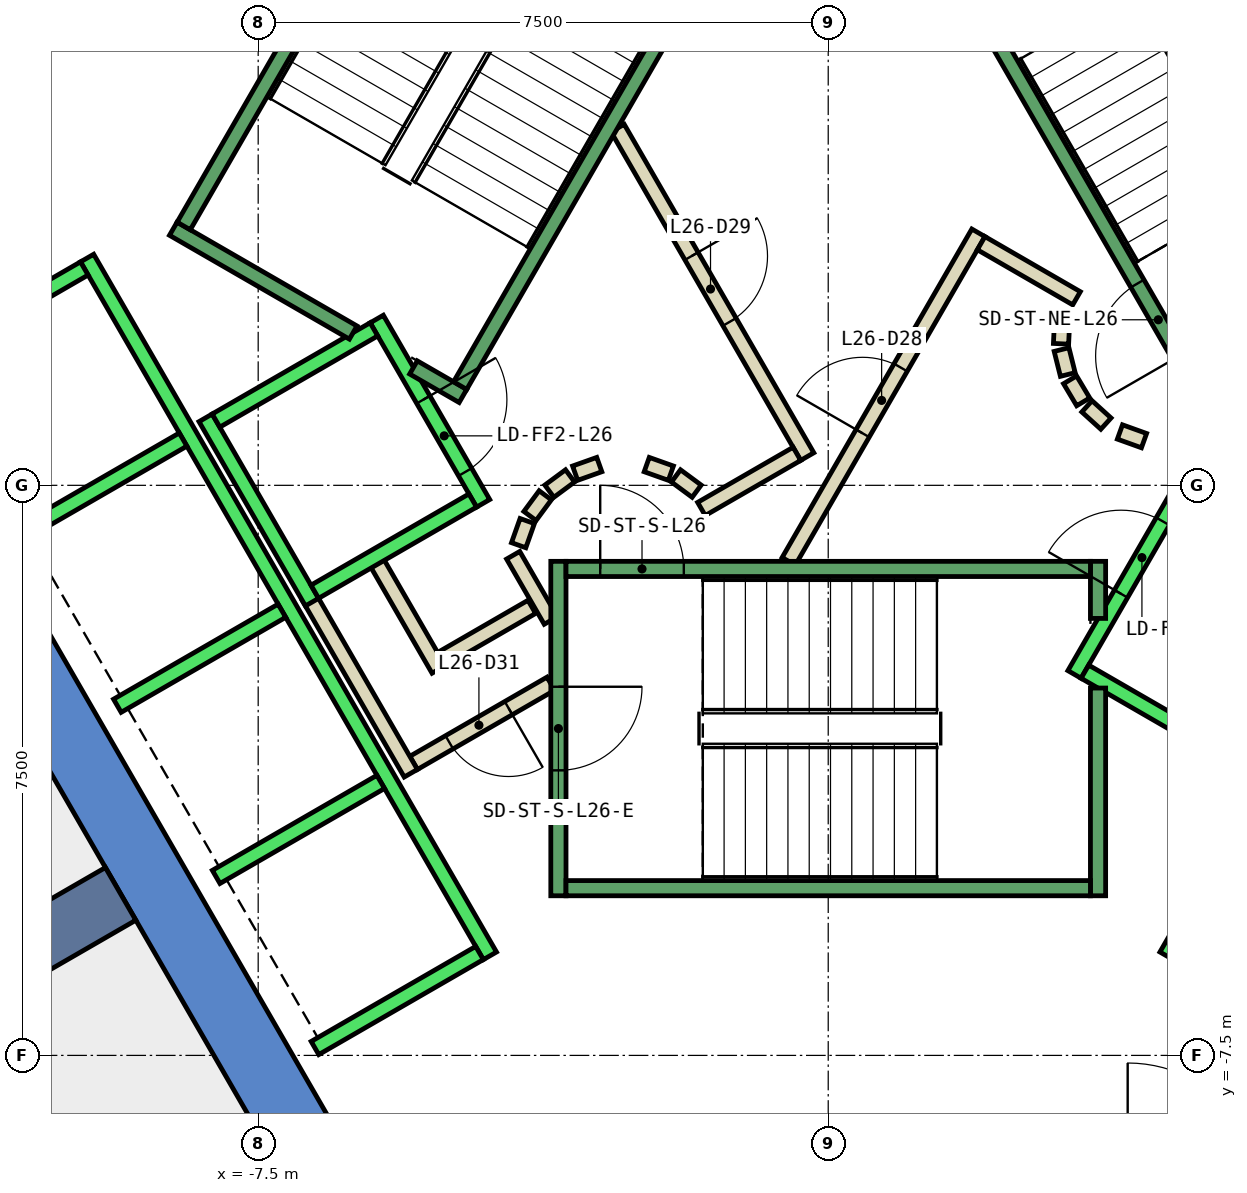
"""IFC4 building model, lengths in metres.
Left out: names, types, materials, properties, quantities, classifications, styles, units other than length and angle.
Written with IfcOpenShell. Run it as: python <this file> out.ifc"""

import sys

from ifc_helpers import new_model, si_unit, direction, frame, frame_2d, origin, place, context, subcontext, project, spatial, polyline, rectangle, outline, extrude, element, fill, save


model = new_model("IFC4")
c1 = context("Model", 3, precision=1e-05, world=origin(), true_north=direction((0.0, 1.0)))
c2 = subcontext(c1, "Body", "Model", "MODEL_VIEW")
j1 = project(units=[si_unit("LENGTHUNIT", "METRE"), si_unit("PLANEANGLEUNIT", "RADIAN")], contexts=[c1])
p1 = place(None, origin())
s1 = spatial("IfcSite", under=j1, at=p1, CompositionType="ELEMENT")
p2 = place(p1, origin())
s2 = spatial("IfcBuilding", under=s1, at=p2, CompositionType="ELEMENT")
p3 = place(p2, frame((0.0, 0.0, 120.2)))
s3 = spatial("IfcBuildingStorey", under=s2, at=p3, CompositionType="ELEMENT", Elevation=120.2)
p4 = place(p3, frame((0.0, 0.0, -0.4)))
e1 = element("IfcWall", 1, at=p4, inside=s3, PredefinedType="SHEAR", context=c2, shape_type="SweptSolid", body=[
    extrude(outline(polyline([(-12.267, 5.252), (-11.488, 4.802), (-6.409, 13.6), (-6.928, 14.5), (-12.267, 5.252)])), origin(), (0.0, 0.0, 1.0), 4.2),
])
p5 = place(p3, frame((0.0, 0.0, -0.4)))
e2 = element("IfcWall", 2, at=p5, inside=s3, PredefinedType="SHEAR", context=c2, shape_type="SweptSolid", body=[
    extrude(outline(polyline([(-13.856, 2.5), (-6.928, -9.5), (-6.409, -8.6), (-12.817, 2.5), (-13.856, 2.5)])), origin(), (0.0, 0.0, 1.0), 4.2),
])
p6 = place(p3, frame((-9.31, -5.375, -0.4), z_axis=(0.0, 0.0, 1.0), x_axis=(-0.866017533419, -0.500013631625, 0.0)))
e3 = element("IfcWall", 3, at=p6, inside=s3, PredefinedType="SHEAR", context=c2, shape_type="SweptSolid", body=[
    extrude(rectangle(XDim=9.0, YDim=0.8, at=frame_2d((4.5, 0.0))), origin(), (0.0, 0.0, 1.0), 4.2),
])
p7 = place(p3, frame((-3.9, -1.599, 0.0), z_axis=(0.0, 0.0, 1.0), x_axis=(-0.865969445389, -0.500096910261, 0.0)))
e4 = element("IfcWall", 4, at=p7, inside=s3, PredefinedType="PARTITIONING", context=c2, shape_type="SweptSolid", body=[
    extrude(rectangle(XDim=1.373, YDim=0.2, at=frame_2d((0.687, 0.0))), origin(), (0.0, 0.0, 1.0), 3.8),
])
p8 = place(p3, frame((-5.126, -2.422, 0.0), z_axis=(0.0, 0.0, 1.0), x_axis=(-0.500062241894, 0.865989465428, 0.0)))
e5 = element("IfcWall", 5, at=p8, inside=s3, PredefinedType="PARTITIONING", context=c2, shape_type="SweptSolid", body=[
    extrude(rectangle(XDim=1.7, YDim=0.2, at=frame_2d((0.85, 0.0))), origin(), (0.0, 0.0, 1.0), 3.8),
])
p9 = place(p3, frame((-3.65, -2.61, 0.0), z_axis=(0.0, 0.0, 1.0), x_axis=(-0.866072462134, -0.499918483688, 0.0)))
e6 = element("IfcWall", 6, at=p9, inside=s3, PredefinedType="PARTITIONING", context=c2, shape_type="SweptSolid", body=[
    extrude(rectangle(XDim=2.084, YDim=0.2, at=frame_2d((1.042, 0.0))), origin(), (0.0, 0.0, 1.0), 3.8),
])
p10 = place(p9, frame((0.642, 0.0, 0.0)))
e7 = element("IfcOpeningElement", 7, at=p10, cuts=e6, PredefinedType="OPENING", context=c2, shape_type="SweptSolid", body=[
    extrude(rectangle(XDim=0.9, YDim=2.1, at=frame_2d((0.45, 1.05))), frame((0.0, 0.11, 0.0), z_axis=(0.0, -1.0, 0.0), x_axis=(1.0, 0.0, 0.0)), (0.0, 0.0, 1.0), 0.22),
])
p11 = place(p3, frame((-5.492, -3.788, 0.0), z_axis=(0.0, 0.0, 1.0), x_axis=(-0.500008949224, 0.866020236886, 0.0)))
e8 = element("IfcWall", 8, at=p11, inside=s3, PredefinedType="PARTITIONING", context=c2, shape_type="SweptSolid", body=[
    extrude(rectangle(XDim=2.68, YDim=0.2, at=frame_2d((1.34, 0.0))), origin(), (0.0, 0.0, 1.0), 3.8),
])
p12 = place(p3, frame((-4.145, -0.92, 0.0), z_axis=(0.0, 0.0, 1.0), x_axis=(0.499743786207, -0.866173278362, 0.0)))
e9 = element("IfcWall", 9, at=p12, inside=s3, PredefinedType="PARTITIONING", context=c2, shape_type="SweptSolid", body=[
    extrude(rectangle(XDim=0.991, YDim=0.2, at=frame_2d((0.495, 0.0))), origin(), (0.0, 0.0, 1.0), 3.8),
])
p13 = place(p3, frame((-0.52, -1.0, 0.0), z_axis=(0.0, 0.0, 1.0), x_axis=(0.50011622646, 0.865958290007, 0.0)))
e10 = element("IfcWall", 10, at=p13, inside=s3, PredefinedType="PARTITIONING", context=c2, shape_type="SweptSolid", body=[
    extrude(rectangle(XDim=4.991, YDim=0.2, at=frame_2d((2.496, 0.0))), origin(), (0.0, 0.0, 1.0), 3.8),
])
p14 = place(p13, frame((1.945, 0.0, 0.0)))
e11 = element("IfcOpeningElement", 11, at=p14, cuts=e10, PredefinedType="OPENING", context=c2, shape_type="SweptSolid", body=[
    extrude(rectangle(XDim=1.0, YDim=2.1, at=frame_2d((0.5, 1.05))), frame((0.0, 0.11, 0.0), z_axis=(0.0, -1.0, 0.0), x_axis=(1.0, 0.0, 0.0)), (0.0, 0.0, 1.0), 0.22),
])
p15 = place(p3, frame((2.012, 3.186, 0.0), z_axis=(0.0, 0.0, 1.0), x_axis=(0.865891012941, -0.500232699559, 0.0)))
e12 = element("IfcWall", 12, at=p15, inside=s3, PredefinedType="PARTITIONING", context=c2, shape_type="SweptSolid", body=[
    extrude(rectangle(XDim=1.449, YDim=0.2, at=frame_2d((0.725, 0.0))), origin(), (0.0, 0.0, 1.0), 3.8),
])
p16 = place(p3, frame((3.079, 2.199, 0.0), z_axis=(0.0, 0.0, 1.0), x_axis=(-0.047771483479, -0.998858290933, 0.0)))
e13 = element("IfcWall", 13, at=p16, inside=s3, PredefinedType="PARTITIONING", context=c2, shape_type="SweptSolid", body=[
    extrude(rectangle(XDim=0.337, YDim=0.2, at=frame_2d((0.169, 0.0))), origin(), (0.0, 0.0, 1.0), 3.8),
])
p17 = place(p3, frame((3.07, 1.786, 0.0), z_axis=(0.0, 0.0, 1.0), x_axis=(0.242705583207, -0.970099994784, 0.0)))
e14 = element("IfcWall", 14, at=p17, inside=s3, PredefinedType="PARTITIONING", context=c2, shape_type="SweptSolid", body=[
    extrude(rectangle(XDim=0.338, YDim=0.2, at=frame_2d((0.169, 0.0))), origin(), (0.0, 0.0, 1.0), 3.8),
])
for number, where, z_axis, x_axis in (
    (15, (3.182, 1.388, 0.0), (0.0, 0.0, 1.0), (0.512, -0.859, 0.0)),
    (16, (3.404, 1.039, 0.0), (0.0, 0.0, 1.0), (0.74, -0.672, 0.0)),
):
    element("IfcWall", number, at=place(p3, frame(where, z_axis=z_axis, x_axis=x_axis)), inside=s3, PredefinedType="PARTITIONING", context=c2, shape_type="SweptSolid", body=[
        extrude(rectangle(XDim=0.338, YDim=0.2, at=frame_2d((0.169, 0.0))), origin(), (0.0, 0.0, 1.0), 3.8),
    ])
p18 = place(p3, frame((3.838, 0.702, 0.0), z_axis=(0.0, 0.0, 1.0), x_axis=(0.941035081519, -0.338308993895, 0.0)))
e17 = element("IfcWall", 17, at=p18, inside=s3, PredefinedType="PARTITIONING", context=c2, shape_type="SweptSolid", body=[
    extrude(rectangle(XDim=0.337, YDim=0.2, at=frame_2d((0.168, 0.0))), origin(), (0.0, 0.0, 1.0), 3.8),
])
p19 = place(p3, frame((-2.771, 4.7, 0.0), z_axis=(0.0, 0.0, 1.0), x_axis=(0.499969479948, -0.866043023828, 0.0)))
e18 = element("IfcWall", 18, at=p19, inside=s3, PredefinedType="PARTITIONING", context=c2, shape_type="SweptSolid", body=[
    extrude(rectangle(XDim=4.99, YDim=0.2, at=frame_2d((2.495, 0.0))), origin(), (0.0, 0.0, 1.0), 3.8),
])
p20 = place(p19, frame((1.945, 0.0, 0.0)))
e19 = element("IfcOpeningElement", 19, at=p20, cuts=e18, PredefinedType="OPENING", context=c2, shape_type="SweptSolid", body=[
    extrude(rectangle(XDim=1.0, YDim=2.1, at=frame_2d((0.5, 1.05))), frame((0.0, 0.11, 0.0), z_axis=(0.0, -1.0, 0.0), x_axis=(1.0, 0.0, 0.0)), (0.0, 0.0, 1.0), 0.22),
])
p21 = place(p3, frame((-0.412, 0.414, 0.0), z_axis=(0.0, 0.0, 1.0), x_axis=(-0.866017369001, -0.500013916395, 0.0)))
e20 = element("IfcWall", 20, at=p21, inside=s3, PredefinedType="PARTITIONING", context=c2, shape_type="SweptSolid", body=[
    extrude(rectangle(XDim=1.45, YDim=0.2, at=frame_2d((0.725, 0.0))), origin(), (0.0, 0.0, 1.0), 3.8),
])
p22 = place(p3, frame((-1.731, -0.077, 0.0), z_axis=(0.0, 0.0, 1.0), x_axis=(-0.804311165252, 0.594208338422, 0.0)))
e21 = element("IfcWall", 21, at=p22, inside=s3, PredefinedType="PARTITIONING", context=c2, shape_type="SweptSolid", body=[
    extrude(rectangle(XDim=0.338, YDim=0.2, at=frame_2d((0.169, 0.0))), origin(), (0.0, 0.0, 1.0), 3.8),
])
p23 = place(p3, frame((-2.07, 0.16, 0.0), z_axis=(0.0, 0.0, 1.0), x_axis=(-0.942199461132, 0.335052496547, 0.0)))
e22 = element("IfcWall", 22, at=p23, inside=s3, PredefinedType="PARTITIONING", context=c2, shape_type="SweptSolid", body=[
    extrude(rectangle(XDim=0.337, YDim=0.2, at=frame_2d((0.169, 0.0))), origin(), (0.0, 0.0, 1.0), 3.8),
])
p24 = place(p3, frame((-3.012, 0.273, 0.0), z_axis=(0.0, 0.0, 1.0), x_axis=(-0.942280615813, -0.334824194261, 0.0)))
e23 = element("IfcWall", 23, at=p24, inside=s3, PredefinedType="PARTITIONING", context=c2, shape_type="SweptSolid", body=[
    extrude(rectangle(XDim=0.338, YDim=0.2, at=frame_2d((0.169, 0.0))), origin(), (0.0, 0.0, 1.0), 3.8),
])
p25 = place(p3, frame((-3.397, 0.124, 0.0), z_axis=(0.0, 0.0, 1.0), x_axis=(-0.804311165252, -0.594208338422, 0.0)))
e24 = element("IfcWall", 24, at=p25, inside=s3, PredefinedType="PARTITIONING", context=c2, shape_type="SweptSolid", body=[
    extrude(rectangle(XDim=0.338, YDim=0.2, at=frame_2d((0.169, 0.0))), origin(), (0.0, 0.0, 1.0), 3.8),
])
p26 = place(p3, frame((-3.723, -0.131, 0.0), z_axis=(0.0, 0.0, 1.0), x_axis=(-0.594675113454, -0.803966112121, 0.0)))
e25 = element("IfcWall", 25, at=p26, inside=s3, PredefinedType="PARTITIONING", context=c2, shape_type="SweptSolid", body=[
    extrude(rectangle(XDim=0.338, YDim=0.2, at=frame_2d((0.169, 0.0))), origin(), (0.0, 0.0, 1.0), 3.8),
])
p27 = place(p3, frame((-3.96, -0.47, 0.0), z_axis=(0.0, 0.0, 1.0), x_axis=(-0.334824194261, -0.942280615813, 0.0)))
e26 = element("IfcWall", 26, at=p27, inside=s3, PredefinedType="PARTITIONING", context=c2, shape_type="SweptSolid", body=[
    extrude(rectangle(XDim=0.338, YDim=0.2, at=frame_2d((0.169, 0.0))), origin(), (0.0, 0.0, 1.0), 3.8),
])
p28 = place(p3, frame((-5.94, 2.188, 0.0), z_axis=(0.0, 0.0, 1.0), x_axis=(0.49994636267, -0.866056369097, 0.0)))
e27 = element("IfcWall", 27, at=p28, inside=s3, PredefinedType="STANDARD", context=c2, shape_type="SweptSolid", body=[
    extrude(rectangle(XDim=2.8, YDim=0.2, at=frame_2d((1.4, 0.0))), origin(), (0.0, 0.0, 1.0), 3.8),
])
p29 = place(p28, frame((1.225, 0.0, 0.0)))
e28 = element("IfcOpeningElement", 28, at=p29, cuts=e27, PredefinedType="OPENING", context=c2, shape_type="SweptSolid", body=[
    extrude(rectangle(XDim=1.1, YDim=2.1, at=frame_2d((0.55, 1.05))), frame((0.0, 0.11, 0.0), z_axis=(0.0, -1.0, 0.0), x_axis=(1.0, 0.0, 0.0)), (0.0, 0.0, 1.0), 0.22),
])
p30 = place(p3, frame((-8.192, 0.888, 0.0), z_axis=(0.0, 0.0, 1.0), x_axis=(0.49994636267, -0.866056369097, 0.0)))
e29 = element("IfcWall", 29, at=p30, inside=s3, PredefinedType="STANDARD", context=c2, shape_type="SweptSolid", body=[
    extrude(rectangle(XDim=2.8, YDim=0.2, at=frame_2d((1.4, 0.0))), origin(), (0.0, 0.0, 1.0), 3.8),
])
for number, where, z_axis, x_axis in (
    (30, (-5.977, 2.052, 0.0), (0.0, 0.0, 1.0), (-0.866, -0.5, 0.0)),
    (31, (-4.677, -0.2, 0.0), (0.0, 0.0, 1.0), (-0.866, -0.5, 0.0)),
):
    element("IfcWall", number, at=place(p3, frame(where, z_axis=z_axis, x_axis=x_axis)), inside=s3, PredefinedType="STANDARD", context=c2, shape_type="SweptSolid", body=[
        extrude(rectangle(XDim=2.399, YDim=0.2, at=frame_2d((1.2, 0.0))), origin(), (0.0, 0.0, 1.0), 3.8),
    ])
p31 = place(p3, frame((-9.751, 2.99, 0.0), z_axis=(0.0, 0.0, 1.0), x_axis=(0.50000090737, -0.866024879913, 0.0)))
e32 = element("IfcWall", 32, at=p31, inside=s3, PredefinedType="STANDARD", context=c2, shape_type="SweptSolid", body=[
    extrude(rectangle(XDim=10.6, YDim=0.2, at=frame_2d((5.3, 0.0))), origin(), (0.0, 0.0, 1.0), 3.8),
])
p32 = place(p3, frame((-9.788, 2.853, 0.0), z_axis=(0.0, 0.0, 1.0), x_axis=(-0.865998541277, -0.500046524342, 0.0)))
e33 = element("IfcWall", 33, at=p32, inside=s3, PredefinedType="STANDARD", context=c2, shape_type="SweptSolid", body=[
    extrude(rectangle(XDim=2.5, YDim=0.2, at=frame_2d((1.25, 0.0))), origin(), (0.0, 0.0, 1.0), 3.8),
])
for number, where, z_axis, x_axis in (
    (34, (-8.488, 0.602, 0.0), (0.0, 0.0, 1.0), (-0.866, -0.5, 0.0)),
    (35, (-7.188, -1.65, 0.0), (0.0, 0.0, 1.0), (-0.866, -0.5, 0.0)),
    (36, (-5.888, -3.902, 0.0), (0.0, 0.0, 1.0), (-0.866, -0.5, 0.0)),
    (37, (-4.588, -6.153, 0.0), (0.0, 0.0, 1.0), (-0.866, -0.5, 0.0)),
):
    element("IfcWall", number, at=place(p3, frame(where, z_axis=z_axis, x_axis=x_axis)), inside=s3, PredefinedType="STANDARD", context=c2, shape_type="SweptSolid", body=[
        extrude(rectangle(XDim=2.5, YDim=0.2, at=frame_2d((1.25, 0.0))), origin(), (0.0, 0.0, 1.0), 3.8),
    ])
p33 = place(p3, frame((3.24, -2.488, 0.0), z_axis=(0.0, 0.0, 1.0), x_axis=(0.49994636267, 0.866056369097, 0.0)))
e38 = element("IfcWall", 38, at=p33, inside=s3, PredefinedType="STANDARD", context=c2, shape_type="SweptSolid", body=[
    extrude(rectangle(XDim=2.8, YDim=0.2, at=frame_2d((1.4, 0.0))), origin(), (0.0, 0.0, 1.0), 3.8),
])
p34 = place(p33, frame((1.225, 0.0, 0.0)))
e39 = element("IfcOpeningElement", 39, at=p34, cuts=e38, PredefinedType="OPENING", context=c2, shape_type="SweptSolid", body=[
    extrude(rectangle(XDim=1.1, YDim=2.1, at=frame_2d((0.55, 1.05))), frame((0.0, 0.11, 0.0), z_axis=(0.0, -1.0, 0.0), x_axis=(1.0, 0.0, 0.0)), (0.0, 0.0, 1.0), 0.22),
])
p35 = place(p3, frame((3.377, -2.452, 0.0), z_axis=(0.0, 0.0, 1.0), x_axis=(0.865955154139, -0.50012165622, 0.0)))
e40 = element("IfcWall", 40, at=p35, inside=s3, PredefinedType="STANDARD", context=c2, shape_type="SweptSolid", body=[
    extrude(rectangle(XDim=2.4, YDim=0.2, at=frame_2d((1.2, 0.0))), origin(), (0.0, 0.0, 1.0), 3.8),
])
p36 = place(p3, frame((4.451, -6.19, 0.0), z_axis=(0.0, 0.0, 1.0), x_axis=(0.50000090737, 0.866024879913, 0.0)))
e41 = element("IfcWall", 41, at=p36, inside=s3, PredefinedType="STANDARD", context=c2, shape_type="SweptSolid", body=[
    extrude(rectangle(XDim=10.6, YDim=0.2, at=frame_2d((5.3, 0.0))), origin(), (0.0, 0.0, 1.0), 3.8),
])
p37 = place(p3, frame((-3.55, -1.0, 0.0), z_axis=(0.0, 0.0, 1.0), x_axis=(0.0, -1.0, 0.0)))
e42 = element("IfcWall", 42, at=p37, inside=s3, PredefinedType="STANDARD", context=c2, shape_type="SweptSolid", body=[
    extrude(rectangle(XDim=4.4, YDim=0.2, at=frame_2d((2.2, 0.0))), origin(), (0.0, 0.0, 1.0), 3.8),
])
p38 = place(p37, frame((1.65, 0.0, 0.0)))
e43 = element("IfcOpeningElement", 43, at=p38, cuts=e42, PredefinedType="OPENING", context=c2, shape_type="SweptSolid", body=[
    extrude(rectangle(XDim=1.1, YDim=2.2, at=frame_2d((0.55, 1.1))), frame((0.0, 0.11, 0.0), z_axis=(0.0, -1.0, 0.0), x_axis=(1.0, 0.0, 0.0)), (0.0, 0.0, 1.0), 0.22),
])
p39 = place(p3, frame((3.55, -2.667, 0.0), z_axis=(0.0, 0.0, 1.0), x_axis=(0.0, -1.0, 0.0)))
e44 = element("IfcWall", 44, at=p39, inside=s3, PredefinedType="STANDARD", context=c2, shape_type="SweptSolid", body=[
    extrude(rectangle(XDim=2.733, YDim=0.2, at=frame_2d((1.366, 0.0))), origin(), (0.0, 0.0, 1.0), 3.8),
])
p40 = place(p3, frame((3.55, -1.0, 0.0), z_axis=(0.0, 0.0, 1.0), x_axis=(0.0, -1.0, 0.0)))
e45 = element("IfcWall", 45, at=p40, inside=s3, PredefinedType="STANDARD", context=c2, shape_type="SweptSolid", body=[
    extrude(rectangle(XDim=0.751, YDim=0.2, at=frame_2d((0.375, 0.0))), origin(), (0.0, 0.0, 1.0), 3.8),
])
p41 = place(p3, frame((-3.45, -1.1, 0.0), z_axis=(0.0, 0.0, 1.0), x_axis=(1.0, 0.0, 0.0)))
e46 = element("IfcWall", 46, at=p41, inside=s3, PredefinedType="STANDARD", context=c2, shape_type="SweptSolid", body=[
    extrude(rectangle(XDim=6.9, YDim=0.2, at=frame_2d((3.45, 0.0))), origin(), (0.0, 0.0, 1.0), 3.8),
])
p42 = place(p41, frame((0.45, 0.0, 0.0)))
e47 = element("IfcOpeningElement", 47, at=p42, cuts=e46, PredefinedType="OPENING", context=c2, shape_type="SweptSolid", body=[
    extrude(rectangle(XDim=1.1, YDim=2.2, at=frame_2d((0.55, 1.1))), frame((0.0, 0.11, 0.0), z_axis=(0.0, -1.0, 0.0), x_axis=(1.0, 0.0, 0.0)), (0.0, 0.0, 1.0), 0.22),
])
p43 = place(p3, frame((-3.45, -5.3, 0.0), z_axis=(0.0, 0.0, 1.0), x_axis=(1.0, 0.0, 0.0)))
e48 = element("IfcWall", 48, at=p43, inside=s3, PredefinedType="STANDARD", context=c2, shape_type="SweptSolid", body=[
    extrude(rectangle(XDim=6.9, YDim=0.2, at=frame_2d((3.45, 0.0))), origin(), (0.0, 0.0, 1.0), 3.8),
])
p44 = place(p3, frame((4.843, 1.312, 0.0), z_axis=(0.0, 0.0, 1.0), x_axis=(-0.499963383562, 0.866046543262, 0.0)))
e49 = element("IfcWall", 49, at=p44, inside=s3, PredefinedType="STANDARD", context=c2, shape_type="SweptSolid", body=[
    extrude(rectangle(XDim=6.9, YDim=0.2, at=frame_2d((3.45, 0.0))), origin(), (0.0, 0.0, 1.0), 3.8),
])
p45 = place(p44, frame((0.45, 0.0, 0.0)))
e50 = element("IfcOpeningElement", 50, at=p45, cuts=e49, PredefinedType="OPENING", context=c2, shape_type="SweptSolid", body=[
    extrude(rectangle(XDim=1.1, YDim=2.2, at=frame_2d((0.55, 1.1))), frame((0.0, 0.11, 0.0), z_axis=(0.0, -1.0, 0.0), x_axis=(1.0, 0.0, 0.0)), (0.0, 0.0, 1.0), 0.22),
])
p46 = place(p3, frame((-6.25, 2.01, 0.0), z_axis=(0.0, 0.0, 1.0), x_axis=(-0.86611865017, 0.499838457731, 0.0)))
e51 = element("IfcWall", 51, at=p46, inside=s3, PredefinedType="STANDARD", context=c2, shape_type="SweptSolid", body=[
    extrude(rectangle(XDim=2.733, YDim=0.2, at=frame_2d((1.366, 0.0))), origin(), (0.0, 0.0, 1.0), 3.8),
])
p47 = place(p3, frame((-4.806, 1.176, 0.0), z_axis=(0.0, 0.0, 1.0), x_axis=(-0.866558586415, 0.499075361355, 0.0)))
e52 = element("IfcWall", 52, at=p47, inside=s3, PredefinedType="STANDARD", context=c2, shape_type="SweptSolid", body=[
    extrude(rectangle(XDim=0.751, YDim=0.2, at=frame_2d((0.376, 0.0))), origin(), (0.0, 0.0, 1.0), 3.8),
])
p48 = place(p3, frame((-1.393, 7.288, 0.0), z_axis=(0.0, 0.0, 1.0), x_axis=(-0.499963383562, -0.866046543262, 0.0)))
e53 = element("IfcWall", 53, at=p48, inside=s3, PredefinedType="STANDARD", context=c2, shape_type="SweptSolid", body=[
    extrude(rectangle(XDim=6.9, YDim=0.2, at=frame_2d((3.45, 0.0))), origin(), (0.0, 0.0, 1.0), 3.8),
])
p49 = place(p48, frame((0.45, 0.0, 0.0)))
e54 = element("IfcOpeningElement", 54, at=p49, cuts=e53, PredefinedType="OPENING", context=c2, shape_type="SweptSolid", body=[
    extrude(rectangle(XDim=1.1, YDim=2.2, at=frame_2d((0.55, 1.1))), frame((0.0, 0.11, 0.0), z_axis=(0.0, -1.0, 0.0), x_axis=(1.0, 0.0, 0.0)), (0.0, 0.0, 1.0), 0.22),
])
p50 = place(p3, frame((-5.03, 9.388, 0.0), z_axis=(0.0, 0.0, 1.0), x_axis=(-0.499978703459, -0.866037698999, 0.0)))
e55 = element("IfcWall", 55, at=p50, inside=s3, PredefinedType="STANDARD", context=c2, shape_type="SweptSolid", body=[
    extrude(rectangle(XDim=6.9, YDim=0.2, at=frame_2d((3.45, 0.0))), origin(), (0.0, 0.0, 1.0), 3.8),
])
p51 = place(p14, origin())
e56 = element("IfcDoor", 56, at=p51, inside=s3, OperationType="SINGLE_SWING_LEFT", PredefinedType="DOOR", context=c2, shape_type="SweptSolid", body=[
    extrude(rectangle(XDim=1.0, YDim=2.1, at=frame_2d((0.5, 1.05))), frame((0.0, 0.025, 0.0), z_axis=(0.0, -1.0, 0.0), x_axis=(1.0, 0.0, 0.0)), (0.0, 0.0, 1.0), 0.05),
])
fill(e11, e56)
p52 = place(p20, origin())
e57 = element("IfcDoor", 57, at=p52, inside=s3, OperationType="SINGLE_SWING_RIGHT", PredefinedType="DOOR", context=c2, shape_type="SweptSolid", body=[
    extrude(rectangle(XDim=1.0, YDim=2.1, at=frame_2d((0.5, 1.05))), frame((0.0, 0.025, 0.0), z_axis=(0.0, -1.0, 0.0), x_axis=(1.0, 0.0, 0.0)), (0.0, 0.0, 1.0), 0.05),
])
fill(e19, e57)
p53 = place(p10, origin())
e58 = element("IfcDoor", 58, at=p53, inside=s3, OperationType="SINGLE_SWING_LEFT", PredefinedType="DOOR", context=c2, shape_type="SweptSolid", body=[
    extrude(rectangle(XDim=0.9, YDim=2.1, at=frame_2d((0.45, 1.05))), frame((0.0, 0.025, 0.0), z_axis=(0.0, -1.0, 0.0), x_axis=(1.0, 0.0, 0.0)), (0.0, 0.0, 1.0), 0.05),
])
fill(e7, e58)
p54 = place(p34, origin())
e59 = element("IfcDoor", 59, at=p54, inside=s3, OperationType="SLIDING_TO_LEFT", PredefinedType="DOOR", context=c2, shape_type="SweptSolid", body=[
    extrude(rectangle(XDim=1.1, YDim=2.1, at=frame_2d((0.55, 1.05))), frame((0.0, 0.025, 0.0), z_axis=(0.0, -1.0, 0.0), x_axis=(1.0, 0.0, 0.0)), (0.0, 0.0, 1.0), 0.05),
])
fill(e39, e59)
p55 = place(p29, origin())
e60 = element("IfcDoor", 60, at=p55, inside=s3, OperationType="SLIDING_TO_LEFT", PredefinedType="DOOR", context=c2, shape_type="SweptSolid", body=[
    extrude(rectangle(XDim=1.1, YDim=2.1, at=frame_2d((0.55, 1.05))), frame((0.0, 0.025, 0.0), z_axis=(0.0, -1.0, 0.0), x_axis=(1.0, 0.0, 0.0)), (0.0, 0.0, 1.0), 0.05),
])
fill(e28, e60)
p56 = place(p42, origin())
e61 = element("IfcDoor", 61, at=p56, inside=s3, OperationType="SINGLE_SWING_LEFT", PredefinedType="DOOR", context=c2, shape_type="SweptSolid", body=[
    extrude(rectangle(XDim=1.1, YDim=2.2, at=frame_2d((0.55, 1.1))), frame((0.0, 0.025, 0.0), z_axis=(0.0, -1.0, 0.0), x_axis=(1.0, 0.0, 0.0)), (0.0, 0.0, 1.0), 0.05),
])
fill(e47, e61)
p57 = place(p38, origin())
e62 = element("IfcDoor", 62, at=p57, inside=s3, OperationType="SINGLE_SWING_LEFT", PredefinedType="DOOR", context=c2, shape_type="SweptSolid", body=[
    extrude(rectangle(XDim=1.1, YDim=2.2, at=frame_2d((0.55, 1.1))), frame((0.0, 0.025, 0.0), z_axis=(0.0, -1.0, 0.0), x_axis=(1.0, 0.0, 0.0)), (0.0, 0.0, 1.0), 0.05),
])
fill(e43, e62)
p58 = place(p45, origin())
e63 = element("IfcDoor", 63, at=p58, inside=s3, OperationType="SINGLE_SWING_LEFT", PredefinedType="DOOR", context=c2, shape_type="SweptSolid", body=[
    extrude(rectangle(XDim=1.1, YDim=2.2, at=frame_2d((0.55, 1.1))), frame((0.0, 0.025, 0.0), z_axis=(0.0, -1.0, 0.0), x_axis=(1.0, 0.0, 0.0)), (0.0, 0.0, 1.0), 0.05),
])
fill(e50, e63)
save(model, sys.argv[1])
